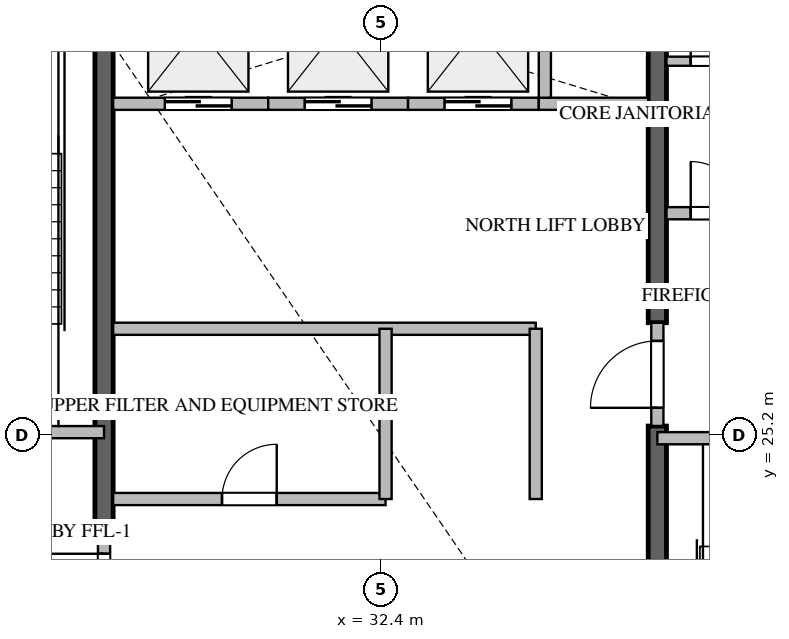
"""IFC4 building model, lengths in metres.
Left out: names, types, materials, properties, quantities, classifications, styles, units other than length and angle.
Written with IfcOpenShell. Run it as: python <this file> out.ifc"""

import sys

from ifc_helpers import new_model, si_unit, direction, frame, frame_2d, origin, place, context, subcontext, project, spatial, rectangle, extrude, source, transform, mapped, element, fill, save


model = new_model("IFC4")
c1 = context("Model", 3, precision=1e-05, world=origin(), true_north=direction((0.0, 1.0)))
c2 = subcontext(c1, "Body", "Model", "MODEL_VIEW")
j1 = project(units=[si_unit("LENGTHUNIT", "METRE"), si_unit("PLANEANGLEUNIT", "RADIAN")], contexts=[c1])
p1 = place(None, origin())
s1 = spatial("IfcSite", under=j1, at=p1, CompositionType="ELEMENT")
p2 = place(p1, origin())
s2 = spatial("IfcBuilding", under=s1, at=p2, CompositionType="ELEMENT")
p3 = place(p2, frame((0.0, 0.0, 333.95)))
s3 = spatial("IfcBuildingStorey", under=s2, at=p3, CompositionType="ELEMENT", Elevation=333.95)
p4 = place(p3, frame((27.85, 23.55, -0.26), z_axis=(0.0, 0.0, 1.0), x_axis=(0.0, 1.0, 0.0)))
e1 = element("IfcWall", 1, at=p4, inside=s3, PredefinedType="SHEAR", context=c2, shape_type="SweptSolid", body=[
    extrude(rectangle(XDim=9.875, YDim=0.3, at=frame_2d((4.938, 0.0))), origin(), (0.0, 0.0, 1.0), 3.868),
])
p5 = place(p3, frame((36.95, 16.975, -0.26), z_axis=(0.0, 0.0, 1.0), x_axis=(0.0, 1.0, 0.0)))
e2 = element("IfcWall", 2, at=p5, inside=s3, PredefinedType="SHEAR", context=c2, shape_type="SweptSolid", body=[
    extrude(rectangle(XDim=8.375, YDim=0.3, at=frame_2d((4.188, 0.0))), origin(), (0.0, 0.0, 1.0), 3.868),
])
p6 = place(p3, frame((36.95, 27.05, -0.26), z_axis=(0.0, 0.0, 1.0), x_axis=(0.0, 1.0, 0.0)))
e3 = element("IfcWall", 3, at=p6, inside=s3, PredefinedType="SHEAR", context=c2, shape_type="SweptSolid", body=[
    extrude(rectangle(XDim=6.375, YDim=0.3, at=frame_2d((3.188, 0.0))), origin(), (0.0, 0.0, 1.0), 3.868),
])
p7 = place(p3, frame((23.4, 25.25, 0.0), z_axis=(0.0, 0.0, 1.0), x_axis=(1.0, 0.0, 0.0)))
e4 = element("IfcWall", 4, at=p7, inside=s3, PredefinedType="STANDARD", context=c2, shape_type="SweptSolid", body=[
    extrude(rectangle(XDim=4.45, YDim=0.2, at=frame_2d((2.225, 0.0))), origin(), (0.0, 0.0, 1.0), 3.61),
])
p8 = place(p7, frame((1.65, 0.0, 0.0)))
e5 = element("IfcOpeningElement", 5, at=p8, cuts=e4, PredefinedType="OPENING", context=c2, shape_type="SweptSolid", body=[
    extrude(rectangle(XDim=1.1, YDim=2.15, at=frame_2d((0.55, 1.075))), frame((0.0, 0.11, 0.0), z_axis=(0.0, -1.0, 0.0), x_axis=(1.0, 0.0, 0.0)), (0.0, 0.0, 1.0), 0.22),
])
p9 = place(p3, frame((36.95, 25.15, 0.0), z_axis=(0.0, 0.0, 1.0), x_axis=(1.0, 0.0, 0.0)))
e6 = element("IfcWall", 6, at=p9, inside=s3, PredefinedType="STANDARD", context=c2, shape_type="SweptSolid", body=[
    extrude(rectangle(XDim=4.45, YDim=0.2, at=frame_2d((2.225, 0.0))), origin(), (0.0, 0.0, 1.0), 3.61),
])
p10 = place(p9, frame((1.65, 0.0, 0.0)))
e7 = element("IfcOpeningElement", 7, at=p10, cuts=e6, PredefinedType="OPENING", context=c2, shape_type="SweptSolid", body=[
    extrude(rectangle(XDim=1.1, YDim=2.15, at=frame_2d((0.55, 1.075))), frame((0.0, 0.11, 0.0), z_axis=(0.0, -1.0, 0.0), x_axis=(1.0, 0.0, 0.0)), (0.0, 0.0, 1.0), 0.22),
])
p11 = place(p3, frame((28.0, 30.65, 0.0), z_axis=(0.0, 0.0, 1.0), x_axis=(1.0, 0.0, 0.0)))
e8 = element("IfcWall", 8, at=p11, inside=s3, PredefinedType="STANDARD", context=c2, shape_type="SweptSolid", body=[
    extrude(rectangle(XDim=2.55, YDim=0.2, at=frame_2d((1.275, 0.0))), origin(), (0.0, 0.0, 1.0), 3.61),
])
p12 = place(p11, frame((0.85, 0.0, 0.0)))
e9 = element("IfcOpeningElement", 9, at=p12, cuts=e8, PredefinedType="OPENING", context=c2, shape_type="SweptSolid", body=[
    extrude(rectangle(XDim=1.1, YDim=2.2, at=frame_2d((0.55, 1.1))), frame((0.0, 0.11, 0.0), z_axis=(0.0, -1.0, 0.0), x_axis=(1.0, 0.0, 0.0)), (0.0, 0.0, 1.0), 0.22),
])
p13 = place(p3, frame((30.55, 30.65, 0.0), z_axis=(0.0, 0.0, 1.0), x_axis=(1.0, 0.0, 0.0)))
e10 = element("IfcWall", 10, at=p13, inside=s3, PredefinedType="STANDARD", context=c2, shape_type="SweptSolid", body=[
    extrude(rectangle(XDim=2.3, YDim=0.2, at=frame_2d((1.15, 0.0))), origin(), (0.0, 0.0, 1.0), 3.61),
])
p14 = place(p13, frame((0.6, 0.0, 0.0)))
e11 = element("IfcOpeningElement", 11, at=p14, cuts=e10, PredefinedType="OPENING", context=c2, shape_type="SweptSolid", body=[
    extrude(rectangle(XDim=1.1, YDim=2.2, at=frame_2d((0.55, 1.1))), frame((0.0, 0.11, 0.0), z_axis=(0.0, -1.0, 0.0), x_axis=(1.0, 0.0, 0.0)), (0.0, 0.0, 1.0), 0.22),
])
p15 = place(p3, frame((32.85, 30.65, 0.0), z_axis=(0.0, 0.0, 1.0), x_axis=(1.0, 0.0, 0.0)))
e12 = element("IfcWall", 12, at=p15, inside=s3, PredefinedType="STANDARD", context=c2, shape_type="SweptSolid", body=[
    extrude(rectangle(XDim=2.15, YDim=0.2, at=frame_2d((1.075, 0.0))), origin(), (0.0, 0.0, 1.0), 3.61),
])
p16 = place(p15, frame((0.6, 0.0, 0.0)))
e13 = element("IfcOpeningElement", 13, at=p16, cuts=e12, PredefinedType="OPENING", context=c2, shape_type="SweptSolid", body=[
    extrude(rectangle(XDim=1.1, YDim=2.2, at=frame_2d((0.55, 1.1))), frame((0.0, 0.11, 0.0), z_axis=(0.0, -1.0, 0.0), x_axis=(1.0, 0.0, 0.0)), (0.0, 0.0, 1.0), 0.22),
])
p17 = place(p3, frame((35.0, 30.65, 0.0), z_axis=(0.0, 0.0, 1.0), x_axis=(1.0, 0.0, 0.0)))
e14 = element("IfcWall", 14, at=p17, inside=s3, PredefinedType="STANDARD", context=c2, shape_type="SweptSolid", body=[
    extrude(rectangle(XDim=1.8, YDim=0.2, at=frame_2d((0.9, 0.0))), origin(), (0.0, 0.0, 1.0), 3.61),
])
p18 = place(p3, frame((35.1, 30.75, 0.0), z_axis=(0.0, 0.0, 1.0), x_axis=(0.0, 1.0, 0.0)))
e15 = element("IfcWall", 15, at=p18, inside=s3, PredefinedType="STANDARD", context=c2, shape_type="SweptSolid", body=[
    extrude(rectangle(XDim=2.675, YDim=0.2, at=frame_2d((1.337, 0.0))), origin(), (0.0, 0.0, 1.0), 3.61),
])
p19 = place(p3, frame((37.1, 28.85, 0.0), z_axis=(0.0, 0.0, 1.0), x_axis=(1.0, 0.0, 0.0)))
e16 = element("IfcWall", 16, at=p19, inside=s3, PredefinedType="STANDARD", context=c2, shape_type="SweptSolid", body=[
    extrude(rectangle(XDim=1.648, YDim=0.2, at=frame_2d((0.824, 0.0))), origin(), (0.0, 0.0, 1.0), 3.61),
])
p20 = place(p19, frame((0.399, 0.0, 0.0)))
e17 = element("IfcOpeningElement", 17, at=p20, cuts=e16, PredefinedType="OPENING", context=c2, shape_type="SweptSolid", body=[
    extrude(rectangle(XDim=0.85, YDim=2.1, at=frame_2d((0.425, 1.05))), frame((0.0, 0.11, 0.0), z_axis=(0.0, -1.0, 0.0), x_axis=(1.0, 0.0, 0.0)), (0.0, 0.0, 1.0), 0.22),
])
p21 = place(p3, frame((27.85, 21.852, 0.0), z_axis=(0.0, 0.0, 1.0), x_axis=(0.0, 1.0, 0.0)))
e18 = element("IfcWall", 18, at=p21, inside=s3, PredefinedType="STANDARD", context=c2, shape_type="SweptSolid", body=[
    extrude(rectangle(XDim=1.696, YDim=0.2, at=frame_2d((0.848, 0.0))), origin(), (0.0, 0.0, 1.0), 3.61),
])
p22 = place(p21, frame((0.298, 0.0, 0.0)))
e19 = element("IfcOpeningElement", 19, at=p22, cuts=e18, PredefinedType="OPENING", context=c2, shape_type="SweptSolid", body=[
    extrude(rectangle(XDim=1.1, YDim=2.15, at=frame_2d((0.55, 1.075))), frame((0.0, 0.11, 0.0), z_axis=(0.0, -1.0, 0.0), x_axis=(1.0, 0.0, 0.0)), (0.0, 0.0, 1.0), 0.22),
])
p23 = place(p3, frame((36.95, 25.352, 0.0), z_axis=(0.0, 0.0, 1.0), x_axis=(0.0, 1.0, 0.0)))
e20 = element("IfcWall", 20, at=p23, inside=s3, PredefinedType="STANDARD", context=c2, shape_type="SweptSolid", body=[
    extrude(rectangle(XDim=1.696, YDim=0.2, at=frame_2d((0.848, 0.0))), origin(), (0.0, 0.0, 1.0), 3.61),
])
p24 = place(p23, frame((0.298, 0.0, 0.0)))
e21 = element("IfcOpeningElement", 21, at=p24, cuts=e20, PredefinedType="OPENING", context=c2, shape_type="SweptSolid", body=[
    extrude(rectangle(XDim=1.1, YDim=2.15, at=frame_2d((0.55, 1.075))), frame((0.0, 0.11, 0.0), z_axis=(0.0, -1.0, 0.0), x_axis=(1.0, 0.0, 0.0)), (0.0, 0.0, 1.0), 0.22),
])
p25 = place(p3, frame((37.1, 31.35, 0.0), z_axis=(0.0, 0.0, 1.0), x_axis=(1.0, 0.0, 0.0)))
e22 = element("IfcWall", 22, at=p25, inside=s3, PredefinedType="PARTITIONING", context=c2, shape_type="SweptSolid", body=[
    extrude(rectangle(XDim=1.648, YDim=0.15, at=frame_2d((0.824, 0.0))), origin(), (0.0, 0.0, 1.0), 3.61),
])
p26 = place(p25, frame((0.399, 0.0, 0.0)))
e23 = element("IfcOpeningElement", 23, at=p26, cuts=e22, PredefinedType="OPENING", context=c2, shape_type="SweptSolid", body=[
    extrude(rectangle(XDim=0.85, YDim=2.1, at=frame_2d((0.425, 1.05))), frame((0.0, 0.085, 0.0), z_axis=(0.0, -1.0, 0.0), x_axis=(1.0, 0.0, 0.0)), (0.0, 0.0, 1.0), 0.17),
])
p27 = place(p3, frame((28.0, 26.95, 0.0), z_axis=(0.0, 0.0, 1.0), x_axis=(1.0, 0.0, 0.0)))
e24 = element("IfcWall", 24, at=p27, inside=s3, PredefinedType="STANDARD", context=c2, shape_type="SweptSolid", body=[
    extrude(rectangle(XDim=6.95, YDim=0.2, at=frame_2d((3.475, 0.0))), origin(), (0.0, 0.0, 1.0), 3.61),
])
p28 = place(p3, frame((34.95, 24.15, 0.0), z_axis=(0.0, 0.0, 1.0), x_axis=(0.0, 1.0, 0.0)))
e25 = element("IfcWall", 25, at=p28, inside=s3, PredefinedType="STANDARD", context=c2, shape_type="SweptSolid", body=[
    extrude(rectangle(XDim=2.8, YDim=0.2, at=frame_2d((1.4, 0.0))), origin(), (0.0, 0.0, 1.0), 3.61),
])
p29 = place(p3, frame((28.0, 24.15, 0.0), z_axis=(0.0, 0.0, 1.0), x_axis=(1.0, 0.0, 0.0)))
e26 = element("IfcWall", 26, at=p29, inside=s3, PredefinedType="STANDARD", context=c2, shape_type="SweptSolid", body=[
    extrude(rectangle(XDim=4.48, YDim=0.2, at=frame_2d((2.24, 0.0))), origin(), (0.0, 0.0, 1.0), 3.61),
])
p30 = place(p29, frame((1.79, 0.0, 0.0)))
e27 = element("IfcOpeningElement", 27, at=p30, cuts=e26, PredefinedType="OPENING", context=c2, shape_type="SweptSolid", body=[
    extrude(rectangle(XDim=0.9, YDim=2.1, at=frame_2d((0.45, 1.05))), frame((0.0, 0.11, 0.0), z_axis=(0.0, -1.0, 0.0), x_axis=(1.0, 0.0, 0.0)), (0.0, 0.0, 1.0), 0.22),
])
p31 = place(p3, frame((32.48, 24.15, 0.0), z_axis=(0.0, 0.0, 1.0), x_axis=(0.0, 1.0, 0.0)))
e28 = element("IfcWall", 28, at=p31, inside=s3, PredefinedType="STANDARD", context=c2, shape_type="SweptSolid", body=[
    extrude(rectangle(XDim=2.8, YDim=0.2, at=frame_2d((1.4, 0.0))), origin(), (0.0, 0.0, 1.0), 3.61),
])
m1 = source(origin(), c2, "Body", "SweptSolid", [
    extrude(rectangle(XDim=1.1, YDim=2.2, at=frame_2d((0.55, 1.1))), frame((0.0, 0.025, 0.0), z_axis=(0.0, -1.0, 0.0), x_axis=(1.0, 0.0, 0.0)), (0.0, 0.0, 1.0), 0.05),
])
p32 = place(p12, origin())
e29 = element("IfcDoor", 29, at=p32, inside=s3, OperationType="DOUBLE_DOOR_SLIDING", PredefinedType="DOOR", context=c2, shape_type="MappedRepresentation", body=[
    mapped(m1, transform((0.0, 0.0, 0.0), scale=1.0)),
])
fill(e9, e29)
p33 = place(p14, origin())
e30 = element("IfcDoor", 30, at=p33, inside=s3, OperationType="DOUBLE_DOOR_SLIDING", PredefinedType="DOOR", context=c2, shape_type="MappedRepresentation", body=[
    mapped(m1, transform((0.0, 0.0, 0.0), scale=1.0)),
])
fill(e11, e30)
p34 = place(p16, origin())
e31 = element("IfcDoor", 31, at=p34, inside=s3, OperationType="DOUBLE_DOOR_SLIDING", PredefinedType="DOOR", context=c2, shape_type="MappedRepresentation", body=[
    mapped(m1, transform((0.0, 0.0, 0.0), scale=1.0)),
])
fill(e13, e31)
m2 = source(origin(), c2, "Body", "SweptSolid", [
    extrude(rectangle(XDim=0.85, YDim=2.1, at=frame_2d((0.425, 1.05))), frame((0.0, 0.025, 0.0), z_axis=(0.0, -1.0, 0.0), x_axis=(1.0, 0.0, 0.0)), (0.0, 0.0, 1.0), 0.05),
])
p35 = place(p20, origin())
e32 = element("IfcDoor", 32, at=p35, inside=s3, OperationType="SINGLE_SWING_LEFT", PredefinedType="DOOR", context=c2, shape_type="MappedRepresentation", body=[
    mapped(m2, transform((0.0, 0.0, 0.0), scale=1.0)),
])
fill(e17, e32)
m3 = source(origin(), c2, "Body", "SweptSolid", [
    extrude(rectangle(XDim=1.1, YDim=2.15, at=frame_2d((0.55, 1.075))), frame((0.0, 0.025, 0.0), z_axis=(0.0, -1.0, 0.0), x_axis=(1.0, 0.0, 0.0)), (0.0, 0.0, 1.0), 0.05),
])
p36 = place(p22, origin())
e33 = element("IfcDoor", 33, at=p36, inside=s3, OperationType="SINGLE_SWING_RIGHT", PredefinedType="DOOR", context=c2, shape_type="MappedRepresentation", body=[
    mapped(m3, transform((0.0, 0.0, 0.0), scale=1.0)),
])
fill(e19, e33)
p37 = place(p24, origin())
e34 = element("IfcDoor", 34, at=p37, inside=s3, OperationType="SINGLE_SWING_LEFT", PredefinedType="DOOR", context=c2, shape_type="MappedRepresentation", body=[
    mapped(m3, transform((0.0, 0.0, 0.0), scale=1.0)),
])
fill(e21, e34)
p38 = place(p26, origin())
e35 = element("IfcDoor", 35, at=p38, inside=s3, OperationType="SINGLE_SWING_LEFT", PredefinedType="DOOR", context=c2, shape_type="MappedRepresentation", body=[
    mapped(m2, transform((0.0, 0.0, 0.0), scale=1.0)),
])
fill(e23, e35)
m4 = source(origin(), c2, "Body", "SweptSolid", [
    extrude(rectangle(XDim=0.9, YDim=2.1, at=frame_2d((0.45, 1.05))), frame((0.0, 0.025, 0.0), z_axis=(0.0, -1.0, 0.0), x_axis=(1.0, 0.0, 0.0)), (0.0, 0.0, 1.0), 0.05),
])
p39 = place(p30, origin())
e36 = element("IfcDoor", 36, at=p39, inside=s3, OperationType="SINGLE_SWING_RIGHT", PredefinedType="DOOR", context=c2, shape_type="MappedRepresentation", body=[
    mapped(m4, transform((0.0, 0.0, 0.0), scale=1.0)),
])
fill(e27, e36)
save(model, sys.argv[1])
